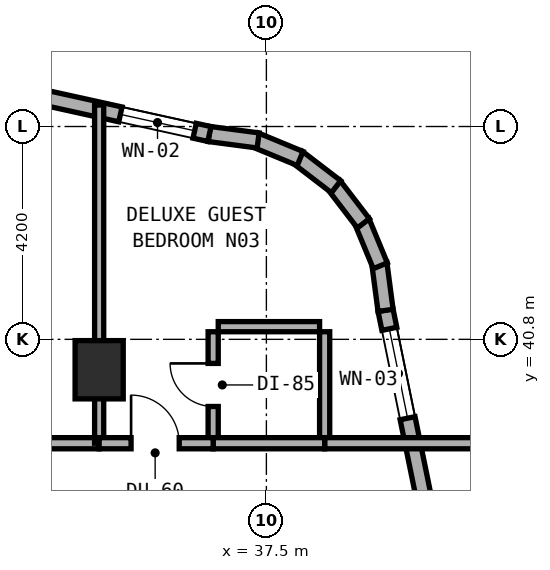
"""IFC4 building model, lengths in metres.
Left out: names, types, materials, properties, quantities, classifications, styles, units other than length and angle.
Written with IfcOpenShell. Run it as: python <this file> out.ifc"""

import sys

from ifc_helpers import new_model, si_unit, direction, frame, frame_2d, origin, origin_2d, place, context, subcontext, project, spatial, rectangle, extrude, element, fill, save


model = new_model("IFC4")
c1 = context("Model", 3, precision=1e-05, world=origin(), true_north=direction((0.0, 1.0)))
c2 = subcontext(c1, "Body", "Model", "MODEL_VIEW")
j1 = project(units=[si_unit("LENGTHUNIT", "METRE"), si_unit("PLANEANGLEUNIT", "RADIAN")], contexts=[c1])
p1 = place(None, origin())
s1 = spatial("IfcSite", under=j1, at=p1, CompositionType="ELEMENT")
p2 = place(p1, origin())
s2 = spatial("IfcBuilding", under=s1, at=p2, CompositionType="ELEMENT")
p3 = place(p2, frame((0.0, 0.0, 69.5)))
s3 = spatial("IfcBuildingStorey", under=s2, at=p3, CompositionType="ELEMENT", Elevation=69.5)
p4 = place(p3, frame((34.2, 40.2, 0.0), z_axis=(0.0, 0.0, 1.0), x_axis=(1.0, 0.0, 0.0)))
e1 = element("IfcColumn", 1, at=p4, inside=s3, PredefinedType="COLUMN", context=c2, shape_type="SweptSolid", body=[
    extrude(rectangle(XDim=0.95, YDim=1.15, at=origin_2d()), origin(), (0.0, 0.0, 1.0), 3.5),
])
p5 = place(p3, frame((41.864, 31.516, 0.0), z_axis=(0.0, 0.0, 1.0), x_axis=(-0.199990901713, 0.979797754249, 0.0)))
e2 = element("IfcWall", 2, at=p5, inside=s3, PredefinedType="STANDARD", context=c2, shape_type="SweptSolid", body=[
    extrude(rectangle(XDim=10.065, YDim=0.3, at=frame_2d((5.033, 0.0))), origin(), (0.0, 0.0, 1.0), 3.22),
])
p6 = place(p5, frame((2.429, 0.0, 0.8)))
e3 = element("IfcOpeningElement", 3, at=p6, cuts=e2, PredefinedType="OPENING", context=c2, shape_type="SweptSolid", body=[
    extrude(rectangle(XDim=2.4, YDim=1.6, at=frame_2d((1.2, 0.8))), frame((0.0, 0.16, 0.0), z_axis=(0.0, -1.0, 0.0), x_axis=(1.0, 0.0, 0.0)), (0.0, 0.0, 1.0), 0.32),
])
p7 = place(p5, frame((7.887, 0.0, 0.85)))
e4 = element("IfcOpeningElement", 4, at=p7, cuts=e2, PredefinedType="OPENING", context=c2, shape_type="SweptSolid", body=[
    extrude(rectangle(XDim=1.8, YDim=1.5, at=frame_2d((0.9, 0.75))), frame((0.0, 0.16, 0.0), z_axis=(0.0, -1.0, 0.0), x_axis=(1.0, 0.0, 0.0)), (0.0, 0.0, 1.0), 0.32),
])
p8 = place(p3, frame((39.852, 41.372, 0.0), z_axis=(0.0, 0.0, 1.0), x_axis=(-0.131174864804, 0.991359246108, 0.0)))
e5 = element("IfcWall", 5, at=p8, inside=s3, PredefinedType="STANDARD", context=c2, shape_type="SweptSolid", body=[
    extrude(rectangle(XDim=0.938, YDim=0.3, at=frame_2d((0.469, 0.0))), origin(), (0.0, 0.0, 1.0), 3.22),
])
p9 = place(p3, frame((39.748, 42.252, 0.0), z_axis=(0.0, 0.0, 1.0), x_axis=(-0.382344263057, 0.924019948111, 0.0)))
e6 = element("IfcWall", 6, at=p9, inside=s3, PredefinedType="STANDARD", context=c2, shape_type="SweptSolid", body=[
    extrude(rectangle(XDim=0.955, YDim=0.3, at=frame_2d((0.477, 0.0))), origin(), (0.0, 0.0, 1.0), 3.22),
])
p10 = place(p3, frame((39.414, 43.089, 0.0), z_axis=(0.0, 0.0, 1.0), x_axis=(-0.608474481025, 0.793573440799, 0.0)))
e7 = element("IfcWall", 7, at=p10, inside=s3, PredefinedType="STANDARD", context=c2, shape_type="SweptSolid", body=[
    extrude(rectangle(XDim=0.955, YDim=0.3, at=frame_2d((0.478, 0.0))), origin(), (0.0, 0.0, 1.0), 3.22),
])
p11 = place(p3, frame((38.875, 43.812, 0.0), z_axis=(0.0, 0.0, 1.0), x_axis=(-0.793668068435, 0.608351047625, 0.0)))
e8 = element("IfcWall", 8, at=p11, inside=s3, PredefinedType="STANDARD", context=c2, shape_type="SweptSolid", body=[
    extrude(rectangle(XDim=0.955, YDim=0.3, at=frame_2d((0.478, 0.0))), origin(), (0.0, 0.0, 1.0), 3.22),
])
p12 = place(p3, frame((38.166, 44.369, 0.0), z_axis=(0.0, 0.0, 1.0), x_axis=(-0.924019948111, 0.382344263057, 0.0)))
e9 = element("IfcWall", 9, at=p12, inside=s3, PredefinedType="STANDARD", context=c2, shape_type="SweptSolid", body=[
    extrude(rectangle(XDim=0.955, YDim=0.3, at=frame_2d((0.477, 0.0))), origin(), (0.0, 0.0, 1.0), 3.22),
])
p13 = place(p3, frame((37.337, 44.725, 0.0), z_axis=(0.0, 0.0, 1.0), x_axis=(-0.991454295543, 0.130454512571, 0.0)))
e10 = element("IfcWall", 10, at=p13, inside=s3, PredefinedType="STANDARD", context=c2, shape_type="SweptSolid", body=[
    extrude(rectangle(XDim=0.973, YDim=0.3, at=frame_2d((0.487, 0.0))), origin(), (0.0, 0.0, 1.0), 3.22),
])
p14 = place(p3, frame((36.376, 44.852, 0.0), z_axis=(0.0, 0.0, 1.0), x_axis=(-0.976540764801, 0.215332614068, 0.0)))
e11 = element("IfcWall", 11, at=p14, inside=s3, PredefinedType="STANDARD", context=c2, shape_type="SweptSolid", body=[
    extrude(rectangle(XDim=9.288, YDim=0.3, at=frame_2d((4.644, 0.0))), origin(), (0.0, 0.0, 1.0), 3.22),
])
p15 = place(p14, frame((0.299, 0.0, 0.85)))
e12 = element("IfcOpeningElement", 12, at=p15, cuts=e11, PredefinedType="OPENING", context=c2, shape_type="SweptSolid", body=[
    extrude(rectangle(XDim=1.5, YDim=1.5, at=frame_2d((0.75, 0.75))), frame((0.0, 0.16, 0.0), z_axis=(0.0, -1.0, 0.0), x_axis=(1.0, 0.0, 0.0)), (0.0, 0.0, 1.0), 0.32),
])
p16 = place(p14, frame((4.598, 0.0, 0.8)))
e13 = element("IfcOpeningElement", 13, at=p16, cuts=e11, PredefinedType="OPENING", context=c2, shape_type="SweptSolid", body=[
    extrude(rectangle(XDim=2.4, YDim=1.6, at=frame_2d((1.2, 0.8))), frame((0.0, 0.16, 0.0), z_axis=(0.0, -1.0, 0.0), x_axis=(1.0, 0.0, 0.0)), (0.0, 0.0, 1.0), 0.32),
])
p17 = place(p3, frame((18.4, 38.75, 0.0), z_axis=(0.0, 0.0, 1.0), x_axis=(1.0, 0.0, 0.0)))
e14 = element("IfcWall", 14, at=p17, inside=s3, PredefinedType="SOLIDWALL", context=c2, shape_type="SweptSolid", body=[
    extrude(rectangle(XDim=15.8, YDim=0.22, at=frame_2d((7.9, 0.0))), origin(), (0.0, 0.0, 1.0), 2.495),
])
p18 = place(p17, frame((8.275, 0.0, 0.0)))
e15 = element("IfcOpeningElement", 15, at=p18, cuts=e14, PredefinedType="OPENING", context=c2, shape_type="SweptSolid", body=[
    extrude(rectangle(XDim=0.95, YDim=2.1, at=frame_2d((0.475, 1.05))), frame((0.0, 0.12, 0.0), z_axis=(0.0, -1.0, 0.0), x_axis=(1.0, 0.0, 0.0)), (0.0, 0.0, 1.0), 0.24),
])
p19 = place(p3, frame((34.2, 38.75, 0.0), z_axis=(0.0, 0.0, 1.0), x_axis=(0.0, 1.0, 0.0)))
e16 = element("IfcWall", 16, at=p19, inside=s3, PredefinedType="SOLIDWALL", context=c2, shape_type="SweptSolid", body=[
    extrude(rectangle(XDim=6.674, YDim=0.18, at=frame_2d((3.337, 0.0))), origin(), (0.0, 0.0, 1.0), 2.495),
])
p20 = place(p3, frame((36.45, 38.85, 0.0), z_axis=(0.0, 0.0, 1.0), x_axis=(0.0, 1.0, 0.0)))
e17 = element("IfcWall", 17, at=p20, inside=s3, PredefinedType="PLUMBINGWALL", context=c2, shape_type="SweptSolid", body=[
    extrude(rectangle(XDim=2.1, YDim=0.2, at=frame_2d((1.05, 0.0))), origin(), (0.0, 0.0, 1.0), 3.22),
])
p21 = place(p20, frame((0.625, 0.0, 0.0)))
e18 = element("IfcOpeningElement", 18, at=p21, cuts=e17, PredefinedType="OPENING", context=c2, shape_type="SweptSolid", body=[
    extrude(rectangle(XDim=0.85, YDim=2.1, at=frame_2d((0.425, 1.05))), frame((0.0, 0.11, 0.0), z_axis=(0.0, -1.0, 0.0), x_axis=(1.0, 0.0, 0.0)), (0.0, 0.0, 1.0), 0.22),
])
p22 = place(p3, frame((36.55, 41.05, 0.0), z_axis=(0.0, 0.0, 1.0), x_axis=(1.0, 0.0, 0.0)))
e19 = element("IfcWall", 19, at=p22, inside=s3, PredefinedType="PLUMBINGWALL", context=c2, shape_type="SweptSolid", body=[
    extrude(rectangle(XDim=2.0, YDim=0.2, at=frame_2d((1.0, 0.0))), origin(), (0.0, 0.0, 1.0), 3.22),
])
p23 = place(p3, frame((38.65, 38.85, 0.0), z_axis=(0.0, 0.0, 1.0), x_axis=(0.0, 1.0, 0.0)))
e20 = element("IfcWall", 20, at=p23, inside=s3, PredefinedType="PLUMBINGWALL", context=c2, shape_type="SweptSolid", body=[
    extrude(rectangle(XDim=2.1, YDim=0.2, at=frame_2d((1.05, 0.0))), origin(), (0.0, 0.0, 1.0), 3.22),
])
p24 = place(p3, frame((38.65, 38.75, 0.0), z_axis=(0.0, 0.0, 1.0), x_axis=(1.0, 0.0, 0.0)))
e21 = element("IfcWall", 21, at=p24, inside=s3, PredefinedType="SOLIDWALL", context=c2, shape_type="SweptSolid", body=[
    extrude(rectangle(XDim=3.19, YDim=0.22, at=frame_2d((1.595, 0.0))), origin(), (0.0, 0.0, 1.0), 3.22),
])
p25 = place(p3, frame((36.45, 38.75, 0.0), z_axis=(0.0, 0.0, 1.0), x_axis=(1.0, 0.0, 0.0)))
e22 = element("IfcWall", 22, at=p25, inside=s3, PredefinedType="SOLIDWALL", context=c2, shape_type="SweptSolid", body=[
    extrude(rectangle(XDim=2.2, YDim=0.22, at=frame_2d((1.1, 0.0))), origin(), (0.0, 0.0, 1.0), 3.22),
])
p26 = place(p3, frame((34.2, 38.75, 0.0), z_axis=(0.0, 0.0, 1.0), x_axis=(1.0, 0.0, 0.0)))
e23 = element("IfcWall", 23, at=p26, inside=s3, PredefinedType="SOLIDWALL", context=c2, shape_type="SweptSolid", body=[
    extrude(rectangle(XDim=2.25, YDim=0.22, at=frame_2d((1.125, 0.0))), origin(), (0.0, 0.0, 1.0), 2.495),
])
p27 = place(p26, frame((0.63, 0.0, 0.0)))
e24 = element("IfcOpeningElement", 24, at=p27, cuts=e23, PredefinedType="OPENING", context=c2, shape_type="SweptSolid", body=[
    extrude(rectangle(XDim=0.95, YDim=2.1, at=frame_2d((0.475, 1.05))), frame((0.0, 0.12, 0.0), z_axis=(0.0, -1.0, 0.0), x_axis=(1.0, 0.0, 0.0)), (0.0, 0.0, 1.0), 0.24),
])
p28 = place(p7, origin())
e25 = element("IfcWindow", 25, at=p28, inside=s3, PartitioningType="SINGLE_PANEL", PredefinedType="WINDOW", context=c2, shape_type="SweptSolid", body=[
    extrude(rectangle(XDim=1.8, YDim=1.5, at=frame_2d((0.9, 0.75))), frame((0.0, 0.03, 0.0), z_axis=(0.0, -1.0, 0.0), x_axis=(1.0, 0.0, 0.0)), (0.0, 0.0, 1.0), 0.06),
])
fill(e4, e25)
p29 = place(p15, origin())
e26 = element("IfcWindow", 26, at=p29, inside=s3, PartitioningType="SINGLE_PANEL", PredefinedType="WINDOW", context=c2, shape_type="SweptSolid", body=[
    extrude(rectangle(XDim=1.5, YDim=1.5, at=frame_2d((0.75, 0.75))), frame((0.0, 0.03, 0.0), z_axis=(0.0, -1.0, 0.0), x_axis=(1.0, 0.0, 0.0)), (0.0, 0.0, 1.0), 0.06),
])
fill(e12, e26)
p30 = place(p21, origin())
e27 = element("IfcDoor", 27, at=p30, inside=s3, OperationType="SINGLE_SWING_RIGHT", PredefinedType="DOOR", context=c2, shape_type="SweptSolid", body=[
    extrude(rectangle(XDim=0.85, YDim=2.1, at=frame_2d((0.425, 1.05))), frame((0.0, 0.025, 0.0), z_axis=(0.0, -1.0, 0.0), x_axis=(1.0, 0.0, 0.0)), (0.0, 0.0, 1.0), 0.05),
])
fill(e18, e27)
p31 = place(p27, origin())
e28 = element("IfcDoor", 28, at=p31, inside=s3, OperationType="SINGLE_SWING_LEFT", PredefinedType="DOOR", context=c2, shape_type="SweptSolid", body=[
    extrude(rectangle(XDim=0.95, YDim=2.1, at=frame_2d((0.475, 1.05))), frame((0.0, 0.025, 0.0), z_axis=(0.0, -1.0, 0.0), x_axis=(1.0, 0.0, 0.0)), (0.0, 0.0, 1.0), 0.05),
])
fill(e24, e28)
save(model, sys.argv[1])
